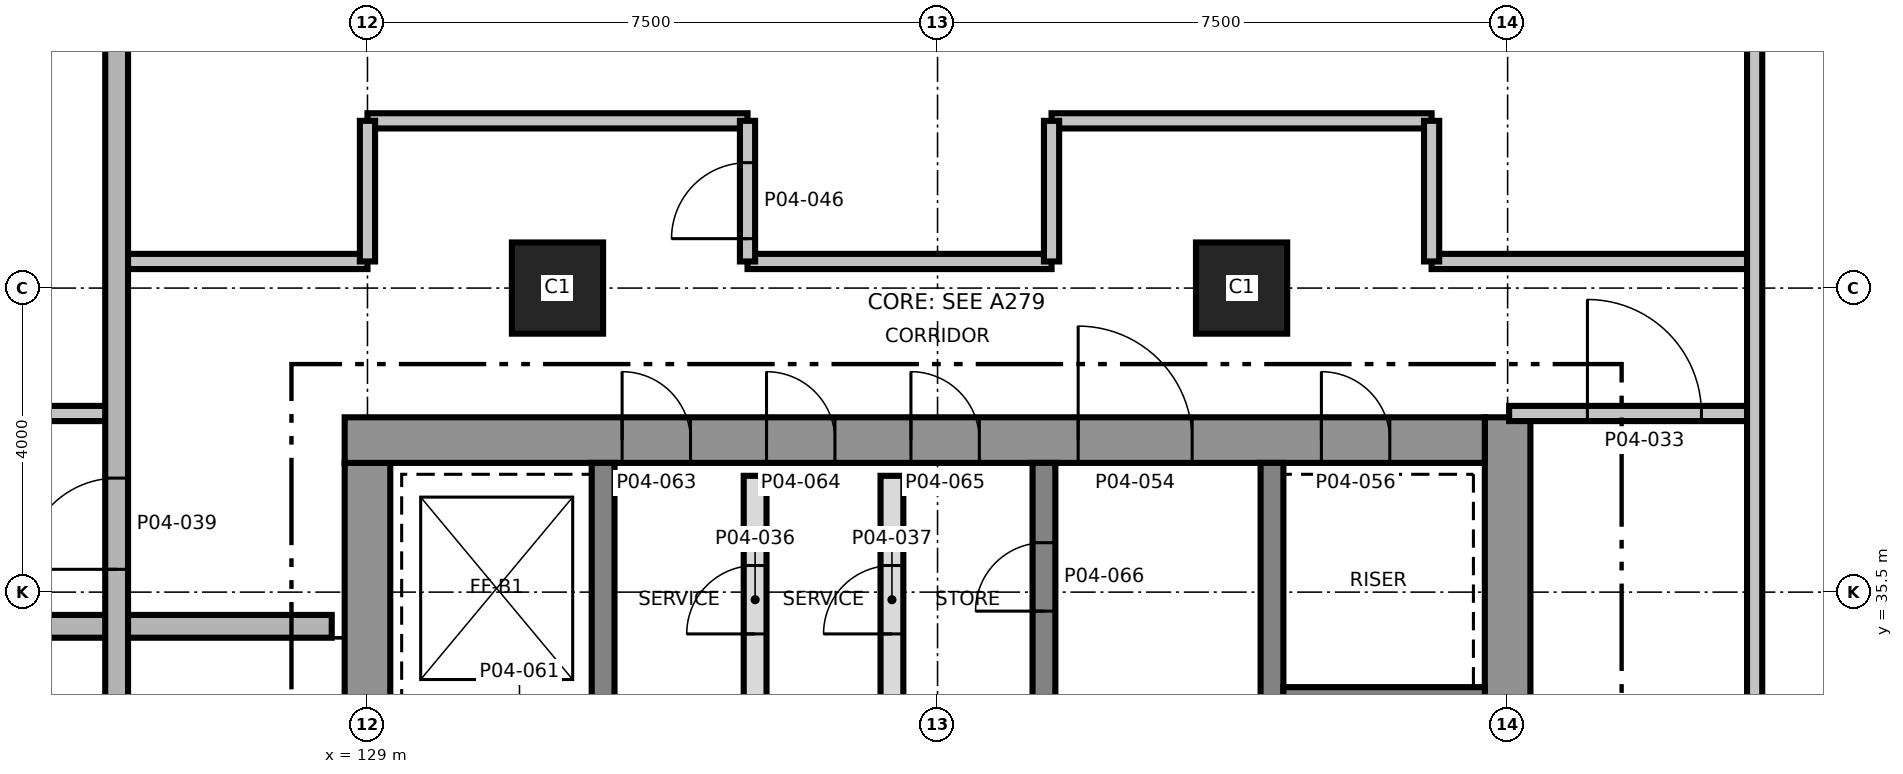
"""IFC4 building model, lengths in metres.
Left out: names, types, materials, properties, quantities, classifications, styles, units other than length and angle.
Written with IfcOpenShell. Run it as: python <this file> out.ifc"""

import sys

from ifc_helpers import new_model, si_unit, direction, frame, frame_2d, origin, origin_2d, place, context, subcontext, project, spatial, rectangle, extrude, element, fill, save


model = new_model("IFC4")
c1 = context("Model", 3, precision=1e-05, world=origin(), true_north=direction((0.0, 1.0)))
c2 = subcontext(c1, "Body", "Model", "MODEL_VIEW")
j1 = project(units=[si_unit("LENGTHUNIT", "METRE"), si_unit("PLANEANGLEUNIT", "RADIAN")], contexts=[c1])
p1 = place(None, origin())
s1 = spatial("IfcSite", under=j1, at=p1, CompositionType="ELEMENT")
p2 = place(p1, origin())
s2 = spatial("IfcBuilding", under=s1, at=p2, CompositionType="ELEMENT")
p3 = place(p2, frame((0.0, 0.0, 23.5)))
s3 = spatial("IfcBuildingStorey", under=s2, at=p3, CompositionType="ELEMENT", Elevation=23.5)
p4 = place(p3, frame((129.0, 24.8, 0.0), z_axis=(0.0, 0.0, 1.0), x_axis=(0.0, 1.0, 0.0)))
e1 = element("IfcWall", 1, at=p4, inside=s3, PredefinedType="SHEAR", context=c2, shape_type="SweptSolid", body=[
    extrude(rectangle(XDim=12.4, YDim=0.6, at=frame_2d((6.2, 0.0))), origin(), (0.0, 0.0, 1.0), 5.0),
])
p5 = place(p4, frame((5.15, 0.0, 0.0)))
e2 = element("IfcOpeningElement", 2, at=p5, cuts=e1, PredefinedType="OPENING", context=c2, shape_type="SweptSolid", body=[
    extrude(rectangle(XDim=1.0, YDim=2.1, at=frame_2d((0.5, 1.05))), frame((0.0, 0.31, 0.0), z_axis=(0.0, -1.0, 0.0), x_axis=(1.0, 0.0, 0.0)), (0.0, 0.0, 1.0), 0.62),
])
p6 = place(p3, frame((144.0, 24.2, 0.0), z_axis=(0.0, 0.0, 1.0), x_axis=(0.0, 1.0, 0.0)))
e3 = element("IfcWall", 3, at=p6, inside=s3, PredefinedType="SHEAR", context=c2, shape_type="SweptSolid", body=[
    extrude(rectangle(XDim=13.6, YDim=0.6, at=frame_2d((6.8, 0.0))), origin(), (0.0, 0.0, 1.0), 5.0),
])
p7 = place(p3, frame((128.7, 37.5, 0.0), z_axis=(0.0, 0.0, 1.0), x_axis=(1.0, 0.0, 0.0)))
e4 = element("IfcWall", 4, at=p7, inside=s3, PredefinedType="SHEAR", context=c2, shape_type="SweptSolid", body=[
    extrude(rectangle(XDim=15.0, YDim=0.6, at=frame_2d((7.5, 0.0))), origin(), (0.0, 0.0, 1.0), 5.0),
])
p8 = place(p7, frame((9.65, 0.0, 0.0)))
e5 = element("IfcOpeningElement", 5, at=p8, cuts=e4, PredefinedType="OPENING", context=c2, shape_type="SweptSolid", body=[
    extrude(rectangle(XDim=1.5, YDim=2.1, at=frame_2d((0.75, 1.05))), frame((0.0, 0.31, 0.0), z_axis=(0.0, -1.0, 0.0), x_axis=(1.0, 0.0, 0.0)), (0.0, 0.0, 1.0), 0.62),
])
p9 = place(p7, frame((12.85, 0.0, 0.0)))
e6 = element("IfcOpeningElement", 6, at=p9, cuts=e4, PredefinedType="OPENING", context=c2, shape_type="SweptSolid", body=[
    extrude(rectangle(XDim=0.9, YDim=2.1, at=frame_2d((0.45, 1.05))), frame((0.0, 0.31, 0.0), z_axis=(0.0, -1.0, 0.0), x_axis=(1.0, 0.0, 0.0)), (0.0, 0.0, 1.0), 0.62),
])
p10 = place(p7, frame((3.65, 0.0, 0.0)))
e7 = element("IfcOpeningElement", 7, at=p10, cuts=e4, PredefinedType="OPENING", context=c2, shape_type="SweptSolid", body=[
    extrude(rectangle(XDim=0.9, YDim=2.1, at=frame_2d((0.45, 1.05))), frame((0.0, 0.31, 0.0), z_axis=(0.0, -1.0, 0.0), x_axis=(1.0, 0.0, 0.0)), (0.0, 0.0, 1.0), 0.62),
])
p11 = place(p7, frame((5.55, 0.0, 0.0)))
e8 = element("IfcOpeningElement", 8, at=p11, cuts=e4, PredefinedType="OPENING", context=c2, shape_type="SweptSolid", body=[
    extrude(rectangle(XDim=0.9, YDim=2.1, at=frame_2d((0.45, 1.05))), frame((0.0, 0.31, 0.0), z_axis=(0.0, -1.0, 0.0), x_axis=(1.0, 0.0, 0.0)), (0.0, 0.0, 1.0), 0.62),
])
p12 = place(p7, frame((7.45, 0.0, 0.0)))
e9 = element("IfcOpeningElement", 9, at=p12, cuts=e4, PredefinedType="OPENING", context=c2, shape_type="SweptSolid", body=[
    extrude(rectangle(XDim=0.9, YDim=2.1, at=frame_2d((0.45, 1.05))), frame((0.0, 0.31, 0.0), z_axis=(0.0, -1.0, 0.0), x_axis=(1.0, 0.0, 0.0)), (0.0, 0.0, 1.0), 0.62),
])
p13 = place(p3, frame((132.1, 24.8, 0.0), z_axis=(0.0, 0.0, 1.0), x_axis=(0.0, 1.0, 0.0)))
e10 = element("IfcWall", 10, at=p13, inside=s3, PredefinedType="SHEAR", context=c2, shape_type="SweptSolid", body=[
    extrude(rectangle(XDim=12.4, YDim=0.3, at=frame_2d((6.2, 0.0))), origin(), (0.0, 0.0, 1.0), 5.0),
])
p14 = place(p13, frame((3.9, 0.0, 0.0)))
e11 = element("IfcOpeningElement", 11, at=p14, cuts=e10, PredefinedType="OPENING", context=c2, shape_type="SweptSolid", body=[
    extrude(rectangle(XDim=1.2, YDim=2.1, at=frame_2d((0.6, 1.05))), frame((0.0, 0.16, 0.0), z_axis=(0.0, -1.0, 0.0), x_axis=(1.0, 0.0, 0.0)), (0.0, 0.0, 1.0), 0.32),
])
p15 = place(p3, frame((137.9, 24.8, 0.0), z_axis=(0.0, 0.0, 1.0), x_axis=(0.0, 1.0, 0.0)))
e12 = element("IfcWall", 12, at=p15, inside=s3, PredefinedType="SHEAR", context=c2, shape_type="SweptSolid", body=[
    extrude(rectangle(XDim=12.4, YDim=0.3, at=frame_2d((6.2, 0.0))), origin(), (0.0, 0.0, 1.0), 5.0),
])
p16 = place(p15, frame((3.95, 0.0, 0.0)))
e13 = element("IfcOpeningElement", 13, at=p16, cuts=e12, PredefinedType="OPENING", context=c2, shape_type="SweptSolid", body=[
    extrude(rectangle(XDim=1.5, YDim=2.1, at=frame_2d((0.75, 1.05))), frame((0.0, 0.16, 0.0), z_axis=(0.0, -1.0, 0.0), x_axis=(1.0, 0.0, 0.0)), (0.0, 0.0, 1.0), 0.32),
])
p17 = place(p15, frame((10.45, 0.0, 0.0)))
e14 = element("IfcOpeningElement", 14, at=p17, cuts=e12, PredefinedType="OPENING", context=c2, shape_type="SweptSolid", body=[
    extrude(rectangle(XDim=0.9, YDim=2.1, at=frame_2d((0.45, 1.05))), frame((0.0, 0.16, 0.0), z_axis=(0.0, -1.0, 0.0), x_axis=(1.0, 0.0, 0.0)), (0.0, 0.0, 1.0), 0.32),
])
p18 = place(p3, frame((140.9, 24.8, 0.0), z_axis=(0.0, 0.0, 1.0), x_axis=(0.0, 1.0, 0.0)))
e15 = element("IfcWall", 15, at=p18, inside=s3, PredefinedType="SHEAR", context=c2, shape_type="SweptSolid", body=[
    extrude(rectangle(XDim=12.4, YDim=0.3, at=frame_2d((6.2, 0.0))), origin(), (0.0, 0.0, 1.0), 5.0),
])
p19 = place(p18, frame((5.9, 0.0, 0.0)))
e16 = element("IfcOpeningElement", 16, at=p19, cuts=e15, PredefinedType="OPENING", context=c2, shape_type="SweptSolid", body=[
    extrude(rectangle(XDim=1.2, YDim=2.1, at=frame_2d((0.6, 1.05))), frame((0.0, 0.16, 0.0), z_axis=(0.0, -1.0, 0.0), x_axis=(1.0, 0.0, 0.0)), (0.0, 0.0, 1.0), 0.32),
])
p20 = place(p3, frame((141.05, 34.1, 0.0), z_axis=(0.0, 0.0, 1.0), x_axis=(1.0, 0.0, 0.0)))
e17 = element("IfcWall", 17, at=p20, inside=s3, PredefinedType="SHEAR", context=c2, shape_type="SweptSolid", body=[
    extrude(rectangle(XDim=2.65, YDim=0.3, at=frame_2d((1.325, 0.0))), origin(), (0.0, 0.0, 1.0), 5.0),
])
for number, where, z_axis, x_axis in (
    (18, (131.5, 39.5, 0.0), (0.0, 0.0, 1.0), (1.0, 0.0, 0.0)),
    (19, (140.5, 39.5, 0.0), (0.0, 0.0, 1.0), (1.0, 0.0, 0.0)),
):
    element("IfcColumn", number, at=place(p3, frame(where, z_axis=z_axis, x_axis=x_axis)), inside=s3, PredefinedType="COLUMN", context=c2, shape_type="SweptSolid", body=[
        extrude(rectangle(XDim=1.2, YDim=1.2, at=origin_2d()), origin(), (0.0, 0.0, 1.0), 5.0),
    ])
p21 = place(p3, frame((114.6, 35.05, 0.0), z_axis=(0.0, 0.0, 1.0), x_axis=(1.0, 0.0, 0.0)))
e20 = element("IfcWall", 20, at=p21, inside=s3, PredefinedType="SHEAR", context=c2, shape_type="SweptSolid", body=[
    extrude(rectangle(XDim=13.93, YDim=0.3, at=frame_2d((6.965, 0.0))), origin(), (0.0, 0.0, 1.0), 4.7),
])
p22 = place(p21, frame((4.83, 0.0, 0.0)))
e21 = element("IfcOpeningElement", 21, at=p22, cuts=e20, PredefinedType="OPENING", context=c2, shape_type="SweptSolid", body=[
    extrude(rectangle(XDim=1.6, YDim=2.1, at=frame_2d((0.8, 1.05))), frame((0.0, 0.16, 0.0), z_axis=(0.0, -1.0, 0.0), x_axis=(1.0, 0.0, 0.0)), (0.0, 0.0, 1.0), 0.32),
])
p23 = place(p3, frame((114.6, 37.85, 0.0), z_axis=(0.0, 0.0, 1.0), x_axis=(1.0, 0.0, 0.0)))
e22 = element("IfcWall", 22, at=p23, inside=s3, PredefinedType="PARTITIONING", context=c2, shape_type="SweptSolid", body=[
    extrude(rectangle(XDim=11.15, YDim=0.2, at=frame_2d((5.575, 0.0))), origin(), (0.0, 0.0, 1.0), 4.7),
])
p24 = place(p23, frame((5.005, 0.0, 0.0)))
e23 = element("IfcOpeningElement", 23, at=p24, cuts=e22, PredefinedType="OPENING", context=c2, shape_type="SweptSolid", body=[
    extrude(rectangle(XDim=1.0, YDim=2.1, at=frame_2d((0.5, 1.05))), frame((0.0, 0.11, 0.0), z_axis=(0.0, -1.0, 0.0), x_axis=(1.0, 0.0, 0.0)), (0.0, 0.0, 1.0), 0.22),
])
p25 = place(p3, frame((144.02, 37.85, 0.0), z_axis=(0.0, 0.0, 1.0), x_axis=(1.0, 0.0, 0.0)))
e24 = element("IfcWall", 24, at=p25, inside=s3, PredefinedType="PARTITIONING", context=c2, shape_type="SweptSolid", body=[
    extrude(rectangle(XDim=3.23, YDim=0.2, at=frame_2d((1.615, 0.0))), origin(), (0.0, 0.0, 1.0), 4.7),
])
p26 = place(p25, frame((1.03, 0.0, 0.0)))
e25 = element("IfcOpeningElement", 25, at=p26, cuts=e24, PredefinedType="OPENING", context=c2, shape_type="SweptSolid", body=[
    extrude(rectangle(XDim=1.5, YDim=2.1, at=frame_2d((0.75, 1.05))), frame((0.0, 0.11, 0.0), z_axis=(0.0, -1.0, 0.0), x_axis=(1.0, 0.0, 0.0)), (0.0, 0.0, 1.0), 0.22),
])
p27 = place(p3, frame((125.75, 39.85, 0.0), z_axis=(0.0, 0.0, 1.0), x_axis=(1.0, 0.0, 0.0)))
e26 = element("IfcWall", 26, at=p27, inside=s3, PredefinedType="PARTITIONING", context=c2, shape_type="SweptSolid", body=[
    extrude(rectangle(XDim=3.25, YDim=0.2, at=frame_2d((1.625, 0.0))), origin(), (0.0, 0.0, 1.0), 4.7),
])
p28 = place(p3, frame((134.0, 39.85, 0.0), z_axis=(0.0, 0.0, 1.0), x_axis=(1.0, 0.0, 0.0)))
e27 = element("IfcWall", 27, at=p28, inside=s3, PredefinedType="PARTITIONING", context=c2, shape_type="SweptSolid", body=[
    extrude(rectangle(XDim=4.0, YDim=0.2, at=frame_2d((2.0, 0.0))), origin(), (0.0, 0.0, 1.0), 4.7),
])
p29 = place(p3, frame((143.0, 39.85, 0.0), z_axis=(0.0, 0.0, 1.0), x_axis=(1.0, 0.0, 0.0)))
e28 = element("IfcWall", 28, at=p29, inside=s3, PredefinedType="PARTITIONING", context=c2, shape_type="SweptSolid", body=[
    extrude(rectangle(XDim=4.25, YDim=0.2, at=frame_2d((2.125, 0.0))), origin(), (0.0, 0.0, 1.0), 4.7),
])
for number, where, z_axis, x_axis in (
    (29, (129.0, 41.7, 0.0), (0.0, 0.0, 1.0), (1.0, 0.0, 0.0)),
    (30, (138.0, 41.7, 0.0), (0.0, 0.0, 1.0), (1.0, 0.0, 0.0)),
):
    element("IfcWall", number, at=place(p3, frame(where, z_axis=z_axis, x_axis=x_axis)), inside=s3, PredefinedType="PARTITIONING", context=c2, shape_type="SweptSolid", body=[
        extrude(rectangle(XDim=5.0, YDim=0.2, at=frame_2d((2.5, 0.0))), origin(), (0.0, 0.0, 1.0), 4.7),
    ])
p30 = place(p3, frame((125.7, 11.07, 0.0), z_axis=(0.0, 0.0, 1.0), x_axis=(0.0, 1.0, 0.0)))
e31 = element("IfcWall", 31, at=p30, inside=s3, PredefinedType="SHEAR", context=c2, shape_type="SweptSolid", body=[
    extrude(rectangle(XDim=38.86, YDim=0.3, at=frame_2d((19.43, 0.0))), origin(), (0.0, 0.0, 1.0), 4.7),
])
p31 = place(p30, frame((24.73, 0.0, 0.0)))
e32 = element("IfcOpeningElement", 32, at=p31, cuts=e31, PredefinedType="OPENING", context=c2, shape_type="SweptSolid", body=[
    extrude(rectangle(XDim=1.2, YDim=2.1, at=frame_2d((0.6, 1.05))), frame((0.0, 0.16, 0.0), z_axis=(0.0, -1.0, 0.0), x_axis=(1.0, 0.0, 0.0)), (0.0, 0.0, 1.0), 0.32),
])
p32 = place(p3, frame((129.0, 39.85, 0.0), z_axis=(0.0, 0.0, 1.0), x_axis=(0.0, 1.0, 0.0)))
e33 = element("IfcWall", 33, at=p32, inside=s3, PredefinedType="PARTITIONING", context=c2, shape_type="SweptSolid", body=[
    extrude(rectangle(XDim=1.85, YDim=0.2, at=frame_2d((0.925, 0.0))), origin(), (0.0, 0.0, 1.0), 4.7),
])
p33 = place(p3, frame((134.0, 39.85, 0.0), z_axis=(0.0, 0.0, 1.0), x_axis=(0.0, 1.0, 0.0)))
e34 = element("IfcWall", 34, at=p33, inside=s3, PredefinedType="PARTITIONING", context=c2, shape_type="SweptSolid", body=[
    extrude(rectangle(XDim=1.85, YDim=0.2, at=frame_2d((0.925, 0.0))), origin(), (0.0, 0.0, 1.0), 4.7),
])
p34 = place(p33, frame((0.3, 0.0, 0.0)))
e35 = element("IfcOpeningElement", 35, at=p34, cuts=e34, PredefinedType="OPENING", context=c2, shape_type="SweptSolid", body=[
    extrude(rectangle(XDim=1.0, YDim=2.1, at=frame_2d((0.5, 1.05))), frame((0.0, 0.11, 0.0), z_axis=(0.0, -1.0, 0.0), x_axis=(1.0, 0.0, 0.0)), (0.0, 0.0, 1.0), 0.22),
])
p35 = place(p3, frame((134.1, 33.77, 0.0), z_axis=(0.0, 0.0, 1.0), x_axis=(0.0, 1.0, 0.0)))
e36 = element("IfcWall", 36, at=p35, inside=s3, PredefinedType="PARTITIONING", context=c2, shape_type="SweptSolid", body=[
    extrude(rectangle(XDim=3.26, YDim=0.3, at=frame_2d((1.63, 0.0))), origin(), (0.0, 0.0, 1.0), 4.7),
])
p36 = place(p35, frame((1.18, 0.0, 0.0)))
e37 = element("IfcOpeningElement", 37, at=p36, cuts=e36, PredefinedType="OPENING", context=c2, shape_type="SweptSolid", body=[
    extrude(rectangle(XDim=0.9, YDim=2.1, at=frame_2d((0.45, 1.05))), frame((0.0, 0.16, 0.0), z_axis=(0.0, -1.0, 0.0), x_axis=(1.0, 0.0, 0.0)), (0.0, 0.0, 1.0), 0.32),
])
p37 = place(p3, frame((135.9, 33.77, 0.0), z_axis=(0.0, 0.0, 1.0), x_axis=(0.0, 1.0, 0.0)))
e38 = element("IfcWall", 38, at=p37, inside=s3, PredefinedType="PARTITIONING", context=c2, shape_type="SweptSolid", body=[
    extrude(rectangle(XDim=3.26, YDim=0.3, at=frame_2d((1.63, 0.0))), origin(), (0.0, 0.0, 1.0), 4.7),
])
p38 = place(p37, frame((1.18, 0.0, 0.0)))
e39 = element("IfcOpeningElement", 39, at=p38, cuts=e38, PredefinedType="OPENING", context=c2, shape_type="SweptSolid", body=[
    extrude(rectangle(XDim=0.9, YDim=2.1, at=frame_2d((0.45, 1.05))), frame((0.0, 0.16, 0.0), z_axis=(0.0, -1.0, 0.0), x_axis=(1.0, 0.0, 0.0)), (0.0, 0.0, 1.0), 0.32),
])
for number, where, z_axis, x_axis in (
    (40, (138.0, 39.85, 0.0), (0.0, 0.0, 1.0), (0.0, 1.0, 0.0)),
    (41, (143.0, 39.85, 0.0), (0.0, 0.0, 1.0), (0.0, 1.0, 0.0)),
):
    element("IfcWall", number, at=place(p3, frame(where, z_axis=z_axis, x_axis=x_axis)), inside=s3, PredefinedType="PARTITIONING", context=c2, shape_type="SweptSolid", body=[
        extrude(rectangle(XDim=1.85, YDim=0.2, at=frame_2d((0.925, 0.0))), origin(), (0.0, 0.0, 1.0), 4.7),
    ])
p39 = place(p3, frame((147.25, 11.07, 0.0), z_axis=(0.0, 0.0, 1.0), x_axis=(0.0, 1.0, 0.0)))
e42 = element("IfcWall", 42, at=p39, inside=s3, PredefinedType="PARTITIONING", context=c2, shape_type="SweptSolid", body=[
    extrude(rectangle(XDim=38.86, YDim=0.2, at=frame_2d((19.43, 0.0))), origin(), (0.0, 0.0, 1.0), 4.7),
])
p40 = place(p39, frame((18.18, 0.0, 0.0)))
e43 = element("IfcOpeningElement", 43, at=p40, cuts=e42, PredefinedType="OPENING", context=c2, shape_type="SweptSolid", body=[
    extrude(rectangle(XDim=1.5, YDim=2.1, at=frame_2d((0.75, 1.05))), frame((0.0, 0.11, 0.0), z_axis=(0.0, -1.0, 0.0), x_axis=(1.0, 0.0, 0.0)), (0.0, 0.0, 1.0), 0.22),
])
p41 = place(p26, origin())
e44 = element("IfcDoor", 44, at=p41, inside=s3, OperationType="SINGLE_SWING_LEFT", PredefinedType="DOOR", context=c2, shape_type="SweptSolid", body=[
    extrude(rectangle(XDim=1.5, YDim=2.1, at=frame_2d((0.75, 1.05))), frame((0.0, 0.025, 0.0), z_axis=(0.0, -1.0, 0.0), x_axis=(1.0, 0.0, 0.0)), (0.0, 0.0, 1.0), 0.05),
])
fill(e25, e44)
p42 = place(p36, origin())
e45 = element("IfcDoor", 45, at=p42, inside=s3, OperationType="SINGLE_SWING_RIGHT", PredefinedType="DOOR", context=c2, shape_type="SweptSolid", body=[
    extrude(rectangle(XDim=0.9, YDim=2.1, at=frame_2d((0.45, 1.05))), frame((0.0, 0.025, 0.0), z_axis=(0.0, -1.0, 0.0), x_axis=(1.0, 0.0, 0.0)), (0.0, 0.0, 1.0), 0.05),
])
fill(e37, e45)
p43 = place(p38, origin())
e46 = element("IfcDoor", 46, at=p43, inside=s3, OperationType="SINGLE_SWING_LEFT", PredefinedType="DOOR", context=c2, shape_type="SweptSolid", body=[
    extrude(rectangle(XDim=0.9, YDim=2.1, at=frame_2d((0.45, 1.05))), frame((0.0, 0.025, 0.0), z_axis=(0.0, -1.0, 0.0), x_axis=(1.0, 0.0, 0.0)), (0.0, 0.0, 1.0), 0.05),
])
fill(e39, e46)
p44 = place(p31, origin())
e47 = element("IfcDoor", 47, at=p44, inside=s3, OperationType="SINGLE_SWING_LEFT", PredefinedType="DOOR", context=c2, shape_type="SweptSolid", body=[
    extrude(rectangle(XDim=1.2, YDim=2.1, at=frame_2d((0.6, 1.05))), frame((0.0, 0.025, 0.0), z_axis=(0.0, -1.0, 0.0), x_axis=(1.0, 0.0, 0.0)), (0.0, 0.0, 1.0), 0.05),
])
fill(e32, e47)
p45 = place(p34, origin())
e48 = element("IfcDoor", 48, at=p45, inside=s3, OperationType="SINGLE_SWING_RIGHT", PredefinedType="DOOR", context=c2, shape_type="SweptSolid", body=[
    extrude(rectangle(XDim=1.0, YDim=2.1, at=frame_2d((0.5, 1.05))), frame((0.0, 0.025, 0.0), z_axis=(0.0, -1.0, 0.0), x_axis=(1.0, 0.0, 0.0)), (0.0, 0.0, 1.0), 0.05),
])
fill(e35, e48)
p46 = place(p8, origin())
e49 = element("IfcDoor", 49, at=p46, inside=s3, OperationType="SINGLE_SWING_RIGHT", PredefinedType="DOOR", context=c2, shape_type="SweptSolid", body=[
    extrude(rectangle(XDim=1.5, YDim=2.1, at=frame_2d((0.75, 1.05))), frame((0.0, 0.025, 0.0), z_axis=(0.0, -1.0, 0.0), x_axis=(1.0, 0.0, 0.0)), (0.0, 0.0, 1.0), 0.05),
])
fill(e5, e49)
p47 = place(p9, origin())
e50 = element("IfcDoor", 50, at=p47, inside=s3, OperationType="SINGLE_SWING_RIGHT", PredefinedType="DOOR", context=c2, shape_type="SweptSolid", body=[
    extrude(rectangle(XDim=0.9, YDim=2.1, at=frame_2d((0.45, 1.05))), frame((0.0, 0.025, 0.0), z_axis=(0.0, -1.0, 0.0), x_axis=(1.0, 0.0, 0.0)), (0.0, 0.0, 1.0), 0.05),
])
fill(e6, e50)
p48 = place(p10, origin())
e51 = element("IfcDoor", 51, at=p48, inside=s3, OperationType="SINGLE_SWING_LEFT", PredefinedType="DOOR", context=c2, shape_type="SweptSolid", body=[
    extrude(rectangle(XDim=0.9, YDim=2.1, at=frame_2d((0.45, 1.05))), frame((0.0, 0.025, 0.0), z_axis=(0.0, -1.0, 0.0), x_axis=(1.0, 0.0, 0.0)), (0.0, 0.0, 1.0), 0.05),
])
fill(e7, e51)
p49 = place(p11, origin())
e52 = element("IfcDoor", 52, at=p49, inside=s3, OperationType="SINGLE_SWING_RIGHT", PredefinedType="DOOR", context=c2, shape_type="SweptSolid", body=[
    extrude(rectangle(XDim=0.9, YDim=2.1, at=frame_2d((0.45, 1.05))), frame((0.0, 0.025, 0.0), z_axis=(0.0, -1.0, 0.0), x_axis=(1.0, 0.0, 0.0)), (0.0, 0.0, 1.0), 0.05),
])
fill(e8, e52)
p50 = place(p12, origin())
e53 = element("IfcDoor", 53, at=p50, inside=s3, OperationType="SINGLE_SWING_LEFT", PredefinedType="DOOR", context=c2, shape_type="SweptSolid", body=[
    extrude(rectangle(XDim=0.9, YDim=2.1, at=frame_2d((0.45, 1.05))), frame((0.0, 0.025, 0.0), z_axis=(0.0, -1.0, 0.0), x_axis=(1.0, 0.0, 0.0)), (0.0, 0.0, 1.0), 0.05),
])
fill(e9, e53)
p51 = place(p17, origin())
e54 = element("IfcDoor", 54, at=p51, inside=s3, OperationType="SINGLE_SWING_RIGHT", PredefinedType="DOOR", context=c2, shape_type="SweptSolid", body=[
    extrude(rectangle(XDim=0.9, YDim=2.1, at=frame_2d((0.45, 1.05))), frame((0.0, 0.025, 0.0), z_axis=(0.0, -1.0, 0.0), x_axis=(1.0, 0.0, 0.0)), (0.0, 0.0, 1.0), 0.05),
])
fill(e14, e54)
save(model, sys.argv[1])
